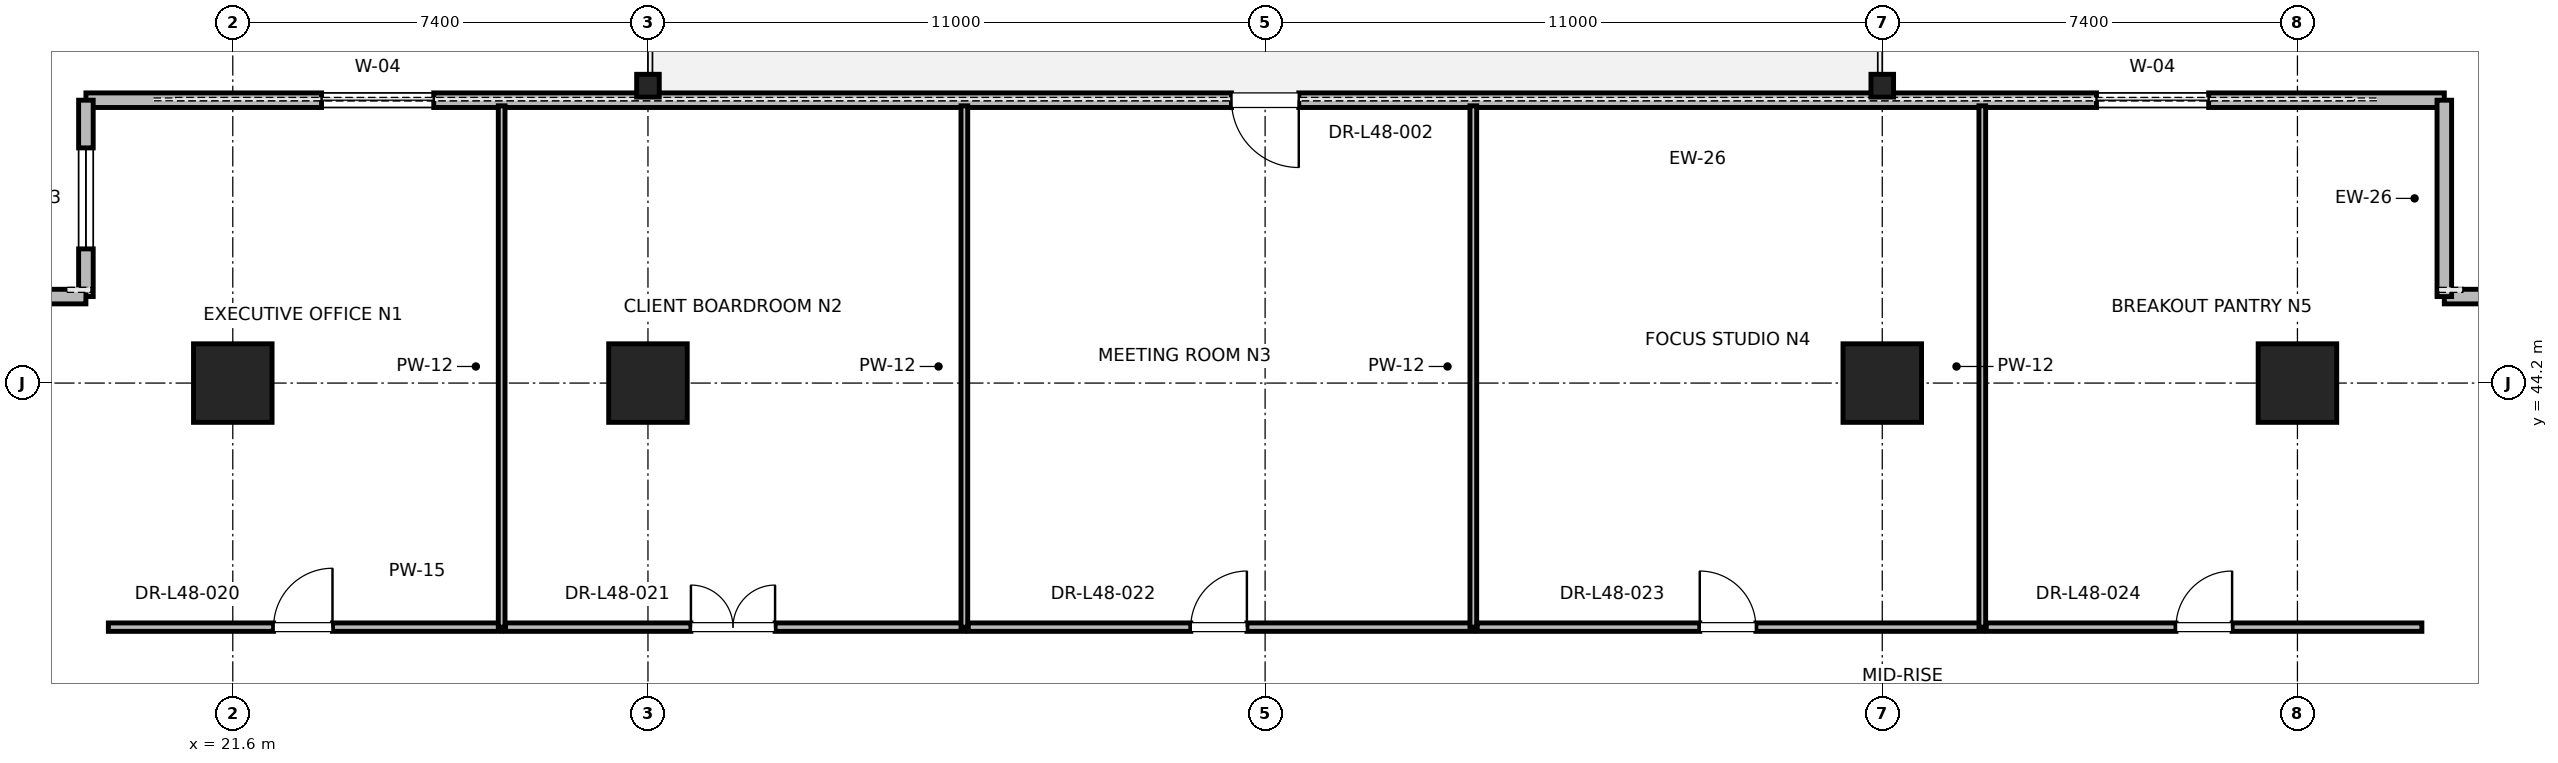
"""IFC4 building model, lengths in metres.
Left out: names, types, materials, properties, quantities, classifications, styles, units other than length and angle.
Written with IfcOpenShell. Run it as: python <this file> out.ifc"""

import sys

from ifc_helpers import new_model, si_unit, direction, frame, frame_2d, origin, origin_2d, place, context, subcontext, project, spatial, rectangle, i_section, extrude, element, fill, save


model = new_model("IFC4")
c1 = context("Model", 3, precision=1e-05, world=origin(), true_north=direction((0.0, 1.0)))
c2 = subcontext(c1, "Body", "Model", "MODEL_VIEW")
j1 = project(units=[si_unit("LENGTHUNIT", "METRE"), si_unit("PLANEANGLEUNIT", "RADIAN")], contexts=[c1])
p1 = place(None, origin())
s1 = spatial("IfcSite", under=j1, at=p1, CompositionType="ELEMENT")
p2 = place(p1, origin())
s2 = spatial("IfcBuilding", under=s1, at=p2, CompositionType="ELEMENT")
p3 = place(p2, frame((0.0, 0.0, 209.2)))
s3 = spatial("IfcBuildingStorey", under=s2, at=p3, CompositionType="ELEMENT", Elevation=209.2)
for number, where, z_axis, x_axis in (
    (1, (29.0, 44.2, 0.0), (0.0, 0.0, 1.0), (1.0, 0.0, 0.0)),
    (2, (51.0, 44.2, 0.0), (0.0, 0.0, 1.0), (1.0, 0.0, 0.0)),
    (3, (21.6, 44.2, 0.0), (0.0, 0.0, 1.0), (1.0, 0.0, 0.0)),
    (4, (58.4, 44.2, 0.0), (0.0, 0.0, 1.0), (1.0, 0.0, 0.0)),
):
    element("IfcColumn", number, at=place(p3, frame(where, z_axis=z_axis, x_axis=x_axis)), inside=s3, PredefinedType="COLUMN", context=c2, shape_type="SweptSolid", body=[
        extrude(rectangle(XDim=1.4, YDim=1.4, at=origin_2d()), origin(), (0.0, 0.0, 1.0), 4.0),
    ])
for number, where, z_axis, x_axis in (
    (5, (29.0, 49.5, 0.0), (0.0, 0.0, 1.0), (1.0, 0.0, 0.0)),
    (6, (51.0, 49.5, 0.0), (0.0, 0.0, 1.0), (1.0, 0.0, 0.0)),
):
    element("IfcColumn", number, at=place(p3, frame(where, z_axis=z_axis, x_axis=x_axis)), inside=s3, PredefinedType="COLUMN", context=c2, shape_type="SweptSolid", body=[
        extrude(i_section(OverallWidth=0.403, OverallDepth=0.406, WebThickness=0.027, FlangeThickness=0.043, FilletRadius=0.015, at=origin_2d()), origin(), (0.0, 0.0, 1.0), 4.0),
    ])
p4 = place(p3, frame((61.018, 49.242, 0.0), z_axis=(0.0, 0.0, 1.0), x_axis=(-1.0, 0.0, 0.0)))
e7 = element("IfcWall", 7, at=p4, inside=s3, PredefinedType="PARAPET", context=c2, shape_type="SweptSolid", body=[
    extrude(rectangle(XDim=42.036, YDim=0.26, at=frame_2d((21.018, 0.0))), origin(), (0.0, 0.0, 1.0), 3.047),
])
p5 = place(p4, frame((4.2, 0.0, 0.85)))
e8 = element("IfcOpeningElement", 8, at=p5, cuts=e7, PredefinedType="OPENING", context=c2, shape_type="SweptSolid", body=[
    extrude(rectangle(XDim=2.0, YDim=2.3, at=frame_2d((1.0, 1.15))), frame((0.0, 0.13, 0.0), z_axis=(0.0, -1.0, 0.0), x_axis=(1.0, 0.0, 0.0)), (0.0, 0.0, 1.0), 0.26),
])
p6 = place(p4, frame((20.418, 0.0, 0.0)))
e9 = element("IfcOpeningElement", 9, at=p6, cuts=e7, PredefinedType="OPENING", context=c2, shape_type="SweptSolid", body=[
    extrude(rectangle(XDim=1.2, YDim=2.2, at=frame_2d((0.6, 1.1))), frame((0.0, 0.13, 0.0), z_axis=(0.0, -1.0, 0.0), x_axis=(1.0, 0.0, 0.0)), (0.0, 0.0, 1.0), 0.26),
])
p7 = place(p4, frame((35.836, 0.0, 0.85)))
e10 = element("IfcOpeningElement", 10, at=p7, cuts=e7, PredefinedType="OPENING", context=c2, shape_type="SweptSolid", body=[
    extrude(rectangle(XDim=2.0, YDim=2.3, at=frame_2d((1.0, 1.15))), frame((0.0, 0.13, 0.0), z_axis=(0.0, -1.0, 0.0), x_axis=(1.0, 0.0, 0.0)), (0.0, 0.0, 1.0), 0.26),
])
p8 = place(p3, frame((65.018, 45.742, 0.0), z_axis=(0.0, 0.0, 1.0), x_axis=(-1.0, 0.0, 0.0)))
e11 = element("IfcWall", 11, at=p8, inside=s3, PredefinedType="PARAPET", context=c2, shape_type="SweptSolid", body=[
    extrude(rectangle(XDim=4.0, YDim=0.26, at=frame_2d((2.0, 0.0))), origin(), (0.0, 0.0, 1.0), 3.775),
])
p9 = place(p8, frame((1.1, 0.0, 0.85)))
e12 = element("IfcOpeningElement", 12, at=p9, cuts=e11, PredefinedType="OPENING", context=c2, shape_type="SweptSolid", body=[
    extrude(rectangle(XDim=1.8, YDim=2.2, at=frame_2d((0.9, 1.1))), frame((0.0, 0.13, 0.0), z_axis=(0.0, -1.0, 0.0), x_axis=(1.0, 0.0, 0.0)), (0.0, 0.0, 1.0), 0.26),
])
p10 = place(p3, frame((61.018, 45.742, 0.0), z_axis=(0.0, 0.0, 1.0), x_axis=(0.0, 1.0, 0.0)))
e13 = element("IfcWall", 13, at=p10, inside=s3, PredefinedType="PARAPET", context=c2, shape_type="SweptSolid", body=[
    extrude(rectangle(XDim=3.5, YDim=0.26, at=frame_2d((1.75, 0.0))), origin(), (0.0, 0.0, 1.0), 3.775),
])
p11 = place(p3, frame((18.982, 49.242, 0.0), z_axis=(0.0, 0.0, 1.0), x_axis=(0.0, -1.0, 0.0)))
e14 = element("IfcWall", 14, at=p11, inside=s3, PredefinedType="PARAPET", context=c2, shape_type="SweptSolid", body=[
    extrude(rectangle(XDim=3.5, YDim=0.26, at=frame_2d((1.75, 0.0))), origin(), (0.0, 0.0, 1.0), 3.775),
])
p12 = place(p11, frame((0.85, 0.0, 0.85)))
e15 = element("IfcOpeningElement", 15, at=p12, cuts=e14, PredefinedType="OPENING", context=c2, shape_type="SweptSolid", body=[
    extrude(rectangle(XDim=1.8, YDim=2.2, at=frame_2d((0.9, 1.1))), frame((0.0, 0.13, 0.0), z_axis=(0.0, -1.0, 0.0), x_axis=(1.0, 0.0, 0.0)), (0.0, 0.0, 1.0), 0.26),
])
p13 = place(p3, frame((18.982, 45.742, 0.0), z_axis=(0.0, 0.0, 1.0), x_axis=(-1.0, 0.0, 0.0)))
e16 = element("IfcWall", 16, at=p13, inside=s3, PredefinedType="PARAPET", context=c2, shape_type="SweptSolid", body=[
    extrude(rectangle(XDim=4.0, YDim=0.26, at=frame_2d((2.0, 0.0))), origin(), (0.0, 0.0, 1.0), 3.775),
])
p14 = place(p3, frame((19.382, 39.85, 0.0), z_axis=(0.0, 0.0, 1.0), x_axis=(1.0, 0.0, 0.0)))
e17 = element("IfcWall", 17, at=p14, inside=s3, PredefinedType="PARTITIONING", context=c2, shape_type="SweptSolid", body=[
    extrude(rectangle(XDim=7.01, YDim=0.15, at=frame_2d((3.505, 0.0))), origin(), (0.0, 0.0, 1.0), 2.85),
])
p15 = place(p14, frame((2.945, 0.0, 0.0)))
e18 = element("IfcOpeningElement", 18, at=p15, cuts=e17, PredefinedType="OPENING", context=c2, shape_type="SweptSolid", body=[
    extrude(rectangle(XDim=1.05, YDim=2.2, at=frame_2d((0.525, 1.1))), frame((0.0, 0.075, 0.0), z_axis=(0.0, -1.0, 0.0), x_axis=(1.0, 0.0, 0.0)), (0.0, 0.0, 1.0), 0.15),
])
p16 = place(p3, frame((26.392, 39.85, 0.0), z_axis=(0.0, 0.0, 1.0), x_axis=(0.0, 1.0, 0.0)))
e19 = element("IfcWall", 19, at=p16, inside=s3, PredefinedType="PARTITIONING", context=c2, shape_type="SweptSolid", body=[
    extrude(rectangle(XDim=9.292, YDim=0.12, at=frame_2d((4.646, 0.0))), origin(), (0.0, 0.0, 1.0), 2.85),
])
p17 = place(p3, frame((26.462, 39.85, 0.0), z_axis=(0.0, 0.0, 1.0), x_axis=(1.0, 0.0, 0.0)))
e20 = element("IfcWall", 20, at=p17, inside=s3, PredefinedType="PARTITIONING", context=c2, shape_type="SweptSolid", body=[
    extrude(rectangle(XDim=8.177, YDim=0.15, at=frame_2d((4.089, 0.0))), origin(), (0.0, 0.0, 1.0), 2.85),
])
p18 = place(p17, frame((3.303, 0.0, 0.0)))
e21 = element("IfcOpeningElement", 21, at=p18, cuts=e20, PredefinedType="OPENING", context=c2, shape_type="SweptSolid", body=[
    extrude(rectangle(XDim=1.5, YDim=2.25, at=frame_2d((0.75, 1.125))), frame((0.0, 0.075, 0.0), z_axis=(0.0, -1.0, 0.0), x_axis=(1.0, 0.0, 0.0)), (0.0, 0.0, 1.0), 0.15),
])
p19 = place(p3, frame((34.639, 39.85, 0.0), z_axis=(0.0, 0.0, 1.0), x_axis=(0.0, 1.0, 0.0)))
e22 = element("IfcWall", 22, at=p19, inside=s3, PredefinedType="PARTITIONING", context=c2, shape_type="SweptSolid", body=[
    extrude(rectangle(XDim=9.292, YDim=0.12, at=frame_2d((4.646, 0.0))), origin(), (0.0, 0.0, 1.0), 2.405),
])
p20 = place(p3, frame((34.709, 39.85, 0.0), z_axis=(0.0, 0.0, 1.0), x_axis=(1.0, 0.0, 0.0)))
e23 = element("IfcWall", 23, at=p20, inside=s3, PredefinedType="PARTITIONING", context=c2, shape_type="SweptSolid", body=[
    extrude(rectangle(XDim=9.002, YDim=0.15, at=frame_2d((4.501, 0.0))), origin(), (0.0, 0.0, 1.0), 2.85),
])
p21 = place(p20, frame((3.966, 0.0, 0.0)))
e24 = element("IfcOpeningElement", 24, at=p21, cuts=e23, PredefinedType="OPENING", context=c2, shape_type="SweptSolid", body=[
    extrude(rectangle(XDim=1.0, YDim=2.15, at=frame_2d((0.5, 1.075))), frame((0.0, 0.075, 0.0), z_axis=(0.0, -1.0, 0.0), x_axis=(1.0, 0.0, 0.0)), (0.0, 0.0, 1.0), 0.15),
])
p22 = place(p3, frame((43.711, 39.85, 0.0), z_axis=(0.0, 0.0, 1.0), x_axis=(0.0, 1.0, 0.0)))
e25 = element("IfcWall", 25, at=p22, inside=s3, PredefinedType="PARTITIONING", context=c2, shape_type="SweptSolid", body=[
    extrude(rectangle(XDim=9.292, YDim=0.12, at=frame_2d((4.646, 0.0))), origin(), (0.0, 0.0, 1.0), 2.405),
])
p23 = place(p3, frame((43.781, 39.85, 0.0), z_axis=(0.0, 0.0, 1.0), x_axis=(1.0, 0.0, 0.0)))
e26 = element("IfcWall", 26, at=p23, inside=s3, PredefinedType="PARTITIONING", context=c2, shape_type="SweptSolid", body=[
    extrude(rectangle(XDim=9.002, YDim=0.15, at=frame_2d((4.501, 0.0))), origin(), (0.0, 0.0, 1.0), 2.85),
])
p24 = place(p23, frame((3.966, 0.0, 0.0)))
e27 = element("IfcOpeningElement", 27, at=p24, cuts=e26, PredefinedType="OPENING", context=c2, shape_type="SweptSolid", body=[
    extrude(rectangle(XDim=1.0, YDim=2.15, at=frame_2d((0.5, 1.075))), frame((0.0, 0.075, 0.0), z_axis=(0.0, -1.0, 0.0), x_axis=(1.0, 0.0, 0.0)), (0.0, 0.0, 1.0), 0.15),
])
p25 = place(p3, frame((52.783, 39.85, 0.0), z_axis=(0.0, 0.0, 1.0), x_axis=(0.0, 1.0, 0.0)))
e28 = element("IfcWall", 28, at=p25, inside=s3, PredefinedType="PARTITIONING", context=c2, shape_type="SweptSolid", body=[
    extrude(rectangle(XDim=9.292, YDim=0.12, at=frame_2d((4.646, 0.0))), origin(), (0.0, 0.0, 1.0), 2.85),
])
p26 = place(p3, frame((52.853, 39.85, 0.0), z_axis=(0.0, 0.0, 1.0), x_axis=(1.0, 0.0, 0.0)))
e29 = element("IfcWall", 29, at=p26, inside=s3, PredefinedType="PARTITIONING", context=c2, shape_type="SweptSolid", body=[
    extrude(rectangle(XDim=7.765, YDim=0.15, at=frame_2d((3.882, 0.0))), origin(), (0.0, 0.0, 1.0), 2.85),
])
p27 = place(p26, frame((3.382, 0.0, 0.0)))
e30 = element("IfcOpeningElement", 30, at=p27, cuts=e29, PredefinedType="OPENING", context=c2, shape_type="SweptSolid", body=[
    extrude(rectangle(XDim=1.0, YDim=2.15, at=frame_2d((0.5, 1.075))), frame((0.0, 0.075, 0.0), z_axis=(0.0, -1.0, 0.0), x_axis=(1.0, 0.0, 0.0)), (0.0, 0.0, 1.0), 0.15),
])
p28 = place(p5, origin())
e31 = element("IfcWindow", 31, at=p28, inside=s3, PartitioningType="SINGLE_PANEL", PredefinedType="WINDOW", context=c2, shape_type="SweptSolid", body=[
    extrude(rectangle(XDim=2.0, YDim=2.3, at=frame_2d((1.0, 1.15))), frame((0.0, 0.03, 0.0), z_axis=(0.0, -1.0, 0.0), x_axis=(1.0, 0.0, 0.0)), (0.0, 0.0, 1.0), 0.06),
])
fill(e8, e31)
p29 = place(p6, origin())
e32 = element("IfcDoor", 32, at=p29, inside=s3, OperationType="SINGLE_SWING_LEFT", PredefinedType="DOOR", context=c2, shape_type="SweptSolid", body=[
    extrude(rectangle(XDim=1.2, YDim=2.2, at=frame_2d((0.6, 1.1))), frame((0.0, 0.025, 0.0), z_axis=(0.0, -1.0, 0.0), x_axis=(1.0, 0.0, 0.0)), (0.0, 0.0, 1.0), 0.05),
])
fill(e9, e32)
p30 = place(p7, origin())
e33 = element("IfcWindow", 33, at=p30, inside=s3, PartitioningType="SINGLE_PANEL", PredefinedType="WINDOW", context=c2, shape_type="SweptSolid", body=[
    extrude(rectangle(XDim=2.0, YDim=2.3, at=frame_2d((1.0, 1.15))), frame((0.0, 0.03, 0.0), z_axis=(0.0, -1.0, 0.0), x_axis=(1.0, 0.0, 0.0)), (0.0, 0.0, 1.0), 0.06),
])
fill(e10, e33)
p31 = place(p12, origin())
e34 = element("IfcWindow", 34, at=p31, inside=s3, PartitioningType="SINGLE_PANEL", PredefinedType="WINDOW", context=c2, shape_type="SweptSolid", body=[
    extrude(rectangle(XDim=1.8, YDim=2.2, at=frame_2d((0.9, 1.1))), frame((0.0, 0.03, 0.0), z_axis=(0.0, -1.0, 0.0), x_axis=(1.0, 0.0, 0.0)), (0.0, 0.0, 1.0), 0.06),
])
fill(e15, e34)
p32 = place(p15, origin())
e35 = element("IfcDoor", 35, at=p32, inside=s3, OperationType="SINGLE_SWING_RIGHT", PredefinedType="DOOR", context=c2, shape_type="SweptSolid", body=[
    extrude(rectangle(XDim=1.05, YDim=2.2, at=frame_2d((0.525, 1.1))), frame((0.0, 0.025, 0.0), z_axis=(0.0, -1.0, 0.0), x_axis=(1.0, 0.0, 0.0)), (0.0, 0.0, 1.0), 0.05),
])
fill(e18, e35)
p33 = place(p18, origin())
e36 = element("IfcDoor", 36, at=p33, inside=s3, OperationType="DOUBLE_DOOR_SINGLE_SWING", PredefinedType="DOOR", context=c2, shape_type="SweptSolid", body=[
    extrude(rectangle(XDim=1.5, YDim=2.25, at=frame_2d((0.75, 1.125))), frame((0.0, 0.025, 0.0), z_axis=(0.0, -1.0, 0.0), x_axis=(1.0, 0.0, 0.0)), (0.0, 0.0, 1.0), 0.05),
])
fill(e21, e36)
p34 = place(p21, origin())
e37 = element("IfcDoor", 37, at=p34, inside=s3, OperationType="SINGLE_SWING_RIGHT", PredefinedType="DOOR", context=c2, shape_type="SweptSolid", body=[
    extrude(rectangle(XDim=1.0, YDim=2.15, at=frame_2d((0.5, 1.075))), frame((0.0, 0.025, 0.0), z_axis=(0.0, -1.0, 0.0), x_axis=(1.0, 0.0, 0.0)), (0.0, 0.0, 1.0), 0.05),
])
fill(e24, e37)
p35 = place(p24, origin())
e38 = element("IfcDoor", 38, at=p35, inside=s3, OperationType="SINGLE_SWING_LEFT", PredefinedType="DOOR", context=c2, shape_type="SweptSolid", body=[
    extrude(rectangle(XDim=1.0, YDim=2.15, at=frame_2d((0.5, 1.075))), frame((0.0, 0.025, 0.0), z_axis=(0.0, -1.0, 0.0), x_axis=(1.0, 0.0, 0.0)), (0.0, 0.0, 1.0), 0.05),
])
fill(e27, e38)
p36 = place(p27, origin())
e39 = element("IfcDoor", 39, at=p36, inside=s3, OperationType="SINGLE_SWING_RIGHT", PredefinedType="DOOR", context=c2, shape_type="SweptSolid", body=[
    extrude(rectangle(XDim=1.0, YDim=2.15, at=frame_2d((0.5, 1.075))), frame((0.0, 0.025, 0.0), z_axis=(0.0, -1.0, 0.0), x_axis=(1.0, 0.0, 0.0)), (0.0, 0.0, 1.0), 0.05),
])
fill(e30, e39)
save(model, sys.argv[1])
